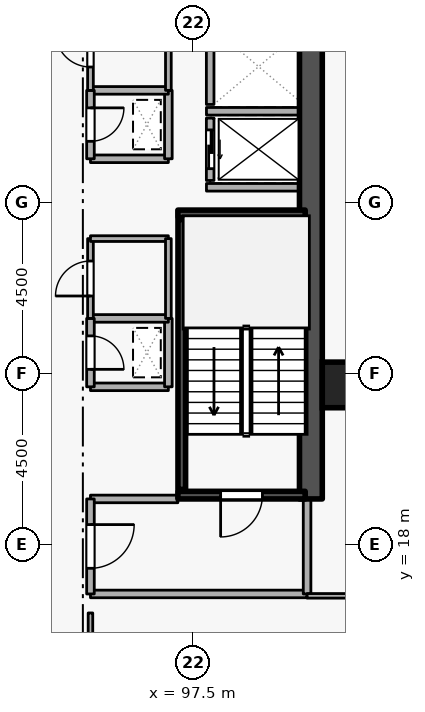
"""IFC4 building model, lengths in metres.
Left out: names, types, materials, properties, quantities, classifications, styles, units other than length and angle.
Written with IfcOpenShell. Run it as: python <this file> out.ifc"""

import sys

from ifc_helpers import new_model, si_unit, direction, frame, frame_2d, origin, origin_2d, place, context, subcontext, project, spatial, rectangle, extrude, element, fill, save


model = new_model("IFC4")
c1 = context("Model", 3, precision=1e-05, world=origin(), true_north=direction((0.0, 1.0)))
c2 = subcontext(c1, "Body", "Model", "MODEL_VIEW")
j1 = project(units=[si_unit("LENGTHUNIT", "METRE"), si_unit("PLANEANGLEUNIT", "RADIAN")], contexts=[c1])
p1 = place(None, origin())
s1 = spatial("IfcSite", under=j1, at=p1, CompositionType="ELEMENT")
p2 = place(p1, origin())
s2 = spatial("IfcBuilding", under=s1, at=p2, CompositionType="ELEMENT")
p3 = place(p2, frame((0.0, 0.0, 98.1)))
s3 = spatial("IfcBuildingStorey", under=s2, at=p3, CompositionType="ELEMENT", Elevation=98.1)
p4 = place(p3, frame((100.6, 19.2, 0.0), z_axis=(0.0, 0.0, 1.0), x_axis=(0.0, 1.0, 0.0)))
e1 = element("IfcWall", 1, at=p4, inside=s3, PredefinedType="SHEAR", context=c2, shape_type="SweptSolid", body=[
    extrude(rectangle(XDim=15.6, YDim=0.6, at=frame_2d((7.8, 0.0))), origin(), (0.0, 0.0, 1.0), 3.6),
])
p5 = place(p3, frame((101.5, 22.2, 0.0), z_axis=(0.0, 0.0, 1.0), x_axis=(1.0, 0.0, 0.0)))
e2 = element("IfcColumn", 2, at=p5, inside=s3, PredefinedType="COLUMN", context=c2, shape_type="SweptSolid", body=[
    extrude(rectangle(XDim=1.2, YDim=1.2, at=origin_2d()), origin(), (0.0, 0.0, 1.0), 3.6),
])
p6 = place(p3, frame((97.95, 29.22, 0.0), z_axis=(0.0, 0.0, 1.0), x_axis=(0.0, -1.0, 0.0)))
e3 = element("IfcWall", 3, at=p6, inside=s3, PredefinedType="STANDARD", context=c2, shape_type="SweptSolid", body=[
    extrude(rectangle(XDim=1.64, YDim=0.2, at=frame_2d((0.82, 0.0))), origin(), (0.0, 0.0, 1.0), 3.3),
])
p7 = place(p6, frame((0.31, 0.0, 0.0)))
e4 = element("IfcOpeningElement", 4, at=p7, cuts=e3, PredefinedType="OPENING", context=c2, shape_type="SweptSolid", body=[
    extrude(rectangle(XDim=1.02, YDim=2.06, at=frame_2d((0.51, 1.03))), frame((0.0, 0.11, 0.0), z_axis=(0.0, -1.0, 0.0), x_axis=(1.0, 0.0, 0.0)), (0.0, 0.0, 1.0), 0.22),
])
p8 = place(p3, frame((97.95, 31.57, 0.0), z_axis=(0.0, 0.0, 1.0), x_axis=(0.0, -1.0, 0.0)))
e5 = element("IfcWall", 5, at=p8, inside=s3, PredefinedType="STANDARD", context=c2, shape_type="SweptSolid", body=[
    extrude(rectangle(XDim=1.99, YDim=0.2, at=frame_2d((0.995, 0.0))), origin(), (0.0, 0.0, 1.0), 3.3),
])
for number, where, z_axis, x_axis in (
    (6, (97.852, 29.4, 0.0), (0.0, 0.0, 1.0), (1.0, 0.0, 0.0)),
    (7, (97.852, 27.4, 0.0), (0.0, 0.0, 1.0), (1.0, 0.0, 0.0)),
):
    element("IfcWall", number, at=place(p3, frame(where, z_axis=z_axis, x_axis=x_axis)), inside=s3, PredefinedType="STANDARD", context=c2, shape_type="SweptSolid", body=[
        extrude(rectangle(XDim=2.436, YDim=0.2, at=frame_2d((1.218, 0.0))), origin(), (0.0, 0.0, 1.0), 3.3),
    ])
p9 = place(p3, frame((100.45, 19.3, 0.0), z_axis=(0.0, 0.0, 1.0), x_axis=(-1.0, 0.0, 0.0)))
e8 = element("IfcWall", 8, at=p9, inside=s3, PredefinedType="SHEAR", context=c2, shape_type="SweptSolid", body=[
    extrude(rectangle(XDim=3.35, YDim=0.2, at=frame_2d((1.675, 0.0))), origin(), (0.0, 0.0, 1.0), 3.6),
])
p10 = place(p9, frame((1.125, 0.0, 0.0)))
e9 = element("IfcOpeningElement", 9, at=p10, cuts=e8, PredefinedType="OPENING", context=c2, shape_type="SweptSolid", body=[
    extrude(rectangle(XDim=1.1, YDim=2.1, at=frame_2d((0.55, 1.05))), frame((0.0, 0.11, 0.0), z_axis=(0.0, -1.0, 0.0), x_axis=(1.0, 0.0, 0.0)), (0.0, 0.0, 1.0), 0.22),
])
p11 = place(p3, frame((97.1, 26.7, 0.0), z_axis=(0.0, 0.0, 1.0), x_axis=(1.0, 0.0, 0.0)))
e10 = element("IfcWall", 10, at=p11, inside=s3, PredefinedType="SHEAR", context=c2, shape_type="SweptSolid", body=[
    extrude(rectangle(XDim=3.35, YDim=0.2, at=frame_2d((1.675, 0.0))), origin(), (0.0, 0.0, 1.0), 3.6),
])
p12 = place(p3, frame((97.203, 26.55, 0.0), z_axis=(0.0, 0.0, 1.0), x_axis=(0.0, -1.0, 0.0)))
e11 = element("IfcWall", 11, at=p12, inside=s3, PredefinedType="SHEAR", context=c2, shape_type="SweptSolid", body=[
    extrude(rectangle(XDim=7.1, YDim=0.2, at=frame_2d((3.55, 0.0))), origin(), (0.0, 0.0, 1.0), 3.6),
])
p13 = place(p3, frame((94.8, 16.7, 0.0), z_axis=(0.0, 0.0, 1.0), x_axis=(1.0, 0.0, 0.0)))
e12 = element("IfcWall", 12, at=p13, inside=s3, PredefinedType="STANDARD", context=c2, shape_type="SweptSolid", body=[
    extrude(rectangle(XDim=5.7, YDim=0.2, at=frame_2d((2.85, 0.0))), origin(), (0.0, 0.0, 1.0), 3.3),
])
p14 = place(p3, frame((100.5, 16.7, 0.0), z_axis=(0.0, 0.0, 1.0), x_axis=(0.0, 1.0, 0.0)))
e13 = element("IfcWall", 13, at=p14, inside=s3, PredefinedType="STANDARD", context=c2, shape_type="SweptSolid", body=[
    extrude(rectangle(XDim=2.5, YDim=0.2, at=frame_2d((1.25, 0.0))), origin(), (0.0, 0.0, 1.0), 3.3),
])
p15 = place(p3, frame((97.1, 19.2, 0.0), z_axis=(0.0, 0.0, 1.0), x_axis=(-1.0, 0.0, 0.0)))
e14 = element("IfcWall", 14, at=p15, inside=s3, PredefinedType="STANDARD", context=c2, shape_type="SweptSolid", body=[
    extrude(rectangle(XDim=2.3, YDim=0.2, at=frame_2d((1.15, 0.0))), origin(), (0.0, 0.0, 1.0), 2.505),
])
p16 = place(p3, frame((94.8, 19.2, 0.0), z_axis=(0.0, 0.0, 1.0), x_axis=(0.0, -1.0, 0.0)))
e15 = element("IfcWall", 15, at=p16, inside=s3, PredefinedType="STANDARD", context=c2, shape_type="SweptSolid", body=[
    extrude(rectangle(XDim=2.5, YDim=0.2, at=frame_2d((1.25, 0.0))), origin(), (0.0, 0.0, 1.0), 3.3),
])
p17 = place(p16, frame((0.675, 0.0, 0.0)))
e16 = element("IfcOpeningElement", 16, at=p17, cuts=e15, PredefinedType="OPENING", context=c2, shape_type="SweptSolid", body=[
    extrude(rectangle(XDim=1.15, YDim=2.1, at=frame_2d((0.575, 1.05))), frame((0.0, 0.11, 0.0), z_axis=(0.0, -1.0, 0.0), x_axis=(1.0, 0.0, 0.0)), (0.0, 0.0, 1.0), 0.22),
])
p18 = place(p3, frame((94.8, 28.15, 0.0), z_axis=(0.0, 0.0, 1.0), x_axis=(1.0, 0.0, 0.0)))
e17 = element("IfcWall", 17, at=p18, inside=s3, PredefinedType="STANDARD", context=c2, shape_type="SweptSolid", body=[
    extrude(rectangle(XDim=2.05, YDim=0.2, at=frame_2d((1.025, 0.0))), origin(), (0.0, 0.0, 1.0), 3.3),
])
p19 = place(p3, frame((96.85, 28.15, 0.0), z_axis=(0.0, 0.0, 1.0), x_axis=(0.0, 1.0, 0.0)))
e18 = element("IfcWall", 18, at=p19, inside=s3, PredefinedType="STANDARD", context=c2, shape_type="SweptSolid", body=[
    extrude(rectangle(XDim=1.8, YDim=0.2, at=frame_2d((0.9, 0.0))), origin(), (0.0, 0.0, 1.0), 3.3),
])
p20 = place(p3, frame((96.85, 29.95, 0.0), z_axis=(0.0, 0.0, 1.0), x_axis=(-1.0, 0.0, 0.0)))
e19 = element("IfcWall", 19, at=p20, inside=s3, PredefinedType="STANDARD", context=c2, shape_type="SweptSolid", body=[
    extrude(rectangle(XDim=2.05, YDim=0.2, at=frame_2d((1.025, 0.0))), origin(), (0.0, 0.0, 1.0), 3.3),
])
p21 = place(p3, frame((94.8, 29.95, 0.0), z_axis=(0.0, 0.0, 1.0), x_axis=(0.0, -1.0, 0.0)))
e20 = element("IfcWall", 20, at=p21, inside=s3, PredefinedType="STANDARD", context=c2, shape_type="SweptSolid", body=[
    extrude(rectangle(XDim=1.8, YDim=0.2, at=frame_2d((0.9, 0.0))), origin(), (0.0, 0.0, 1.0), 3.3),
])
p22 = place(p21, frame((0.46, 0.0, 0.0)))
e21 = element("IfcOpeningElement", 21, at=p22, cuts=e20, PredefinedType="OPENING", context=c2, shape_type="SweptSolid", body=[
    extrude(rectangle(XDim=0.88, YDim=2.04, at=frame_2d((0.44, 1.02))), frame((0.0, 0.11, 0.0), z_axis=(0.0, -1.0, 0.0), x_axis=(1.0, 0.0, 0.0)), (0.0, 0.0, 1.0), 0.22),
])
p23 = place(p3, frame((94.8, 22.15, 0.0), z_axis=(0.0, 0.0, 1.0), x_axis=(1.0, 0.0, 0.0)))
e22 = element("IfcWall", 22, at=p23, inside=s3, PredefinedType="STANDARD", context=c2, shape_type="SweptSolid", body=[
    extrude(rectangle(XDim=2.05, YDim=0.2, at=frame_2d((1.025, 0.0))), origin(), (0.0, 0.0, 1.0), 3.3),
])
p24 = place(p3, frame((96.85, 22.15, 0.0), z_axis=(0.0, 0.0, 1.0), x_axis=(0.0, 1.0, 0.0)))
e23 = element("IfcWall", 23, at=p24, inside=s3, PredefinedType="STANDARD", context=c2, shape_type="SweptSolid", body=[
    extrude(rectangle(XDim=1.8, YDim=0.2, at=frame_2d((0.9, 0.0))), origin(), (0.0, 0.0, 1.0), 3.3),
])
p25 = place(p3, frame((96.85, 23.95, 0.0), z_axis=(0.0, 0.0, 1.0), x_axis=(-1.0, 0.0, 0.0)))
e24 = element("IfcWall", 24, at=p25, inside=s3, PredefinedType="STANDARD", context=c2, shape_type="SweptSolid", body=[
    extrude(rectangle(XDim=2.05, YDim=0.2, at=frame_2d((1.025, 0.0))), origin(), (0.0, 0.0, 1.0), 3.3),
])
p26 = place(p3, frame((94.8, 23.95, 0.0), z_axis=(0.0, 0.0, 1.0), x_axis=(0.0, -1.0, 0.0)))
e25 = element("IfcWall", 25, at=p26, inside=s3, PredefinedType="STANDARD", context=c2, shape_type="SweptSolid", body=[
    extrude(rectangle(XDim=1.8, YDim=0.2, at=frame_2d((0.9, 0.0))), origin(), (0.0, 0.0, 1.0), 3.3),
])
p27 = place(p26, frame((0.46, 0.0, 0.0)))
e26 = element("IfcOpeningElement", 26, at=p27, cuts=e25, PredefinedType="OPENING", context=c2, shape_type="SweptSolid", body=[
    extrude(rectangle(XDim=0.88, YDim=2.04, at=frame_2d((0.44, 1.02))), frame((0.0, 0.11, 0.0), z_axis=(0.0, -1.0, 0.0), x_axis=(1.0, 0.0, 0.0)), (0.0, 0.0, 1.0), 0.22),
])
p28 = place(p3, frame((94.8, 23.95, 0.0), z_axis=(0.0, 0.0, 1.0), x_axis=(0.0, 1.0, 0.0)))
e27 = element("IfcWall", 27, at=p28, inside=s3, PredefinedType="PARTITIONING", context=c2, shape_type="SweptSolid", body=[
    extrude(rectangle(XDim=2.1, YDim=0.15, at=frame_2d((1.05, 0.0))), origin(), (0.0, 0.0, 1.0), 3.3),
])
p29 = place(p28, frame((0.59, 0.0, 0.0)))
e28 = element("IfcOpeningElement", 28, at=p29, cuts=e27, PredefinedType="OPENING", context=c2, shape_type="SweptSolid", body=[
    extrude(rectangle(XDim=0.92, YDim=2.08, at=frame_2d((0.46, 1.04))), frame((0.0, 0.085, 0.0), z_axis=(0.0, -1.0, 0.0), x_axis=(1.0, 0.0, 0.0)), (0.0, 0.0, 1.0), 0.17),
])
p30 = place(p3, frame((94.8, 26.05, 0.0), z_axis=(0.0, 0.0, 1.0), x_axis=(1.0, 0.0, 0.0)))
e29 = element("IfcWall", 29, at=p30, inside=s3, PredefinedType="PARTITIONING", context=c2, shape_type="SweptSolid", body=[
    extrude(rectangle(XDim=2.05, YDim=0.15, at=frame_2d((1.025, 0.0))), origin(), (0.0, 0.0, 1.0), 3.3),
])
p31 = place(p3, frame((96.85, 26.05, 0.0), z_axis=(0.0, 0.0, 1.0), x_axis=(0.0, -1.0, 0.0)))
e30 = element("IfcWall", 30, at=p31, inside=s3, PredefinedType="PARTITIONING", context=c2, shape_type="SweptSolid", body=[
    extrude(rectangle(XDim=2.1, YDim=0.15, at=frame_2d((1.05, 0.0))), origin(), (0.0, 0.0, 1.0), 3.3),
])
p32 = place(p3, frame((94.8, 29.95, 0.0), z_axis=(0.0, 0.0, 1.0), x_axis=(0.0, 1.0, 0.0)))
e31 = element("IfcWall", 31, at=p32, inside=s3, PredefinedType="PARTITIONING", context=c2, shape_type="SweptSolid", body=[
    extrude(rectangle(XDim=2.15, YDim=0.15, at=frame_2d((1.075, 0.0))), origin(), (0.0, 0.0, 1.0), 3.3),
])
p33 = place(p32, frame((0.615, 0.0, 0.0)))
e32 = element("IfcOpeningElement", 32, at=p33, cuts=e31, PredefinedType="OPENING", context=c2, shape_type="SweptSolid", body=[
    extrude(rectangle(XDim=0.92, YDim=2.08, at=frame_2d((0.46, 1.04))), frame((0.0, 0.085, 0.0), z_axis=(0.0, -1.0, 0.0), x_axis=(1.0, 0.0, 0.0)), (0.0, 0.0, 1.0), 0.17),
])
p34 = place(p3, frame((96.85, 32.1, 0.0), z_axis=(0.0, 0.0, 1.0), x_axis=(0.0, -1.0, 0.0)))
e33 = element("IfcWall", 33, at=p34, inside=s3, PredefinedType="PARTITIONING", context=c2, shape_type="SweptSolid", body=[
    extrude(rectangle(XDim=2.15, YDim=0.15, at=frame_2d((1.075, 0.0))), origin(), (0.0, 0.0, 1.0), 3.3),
])
p35 = place(p3, frame((94.8, 14.75, 0.0), z_axis=(0.0, 0.0, 1.0), x_axis=(0.0, 1.0, 0.0)))
e34 = element("IfcWall", 34, at=p35, inside=s3, PredefinedType="PARTITIONING", context=c2, shape_type="SweptSolid", body=[
    extrude(rectangle(XDim=1.45, YDim=0.12, at=frame_2d((0.725, 0.0))), origin(), (0.0, 0.0, 1.0), 3.3),
])
p36 = place(p3, frame((100.5, 16.65, 0.0), z_axis=(0.0, 0.0, 1.0), x_axis=(1.0, 0.0, 0.0)))
e35 = element("IfcWall", 35, at=p36, inside=s3, PredefinedType="PARTITIONING", context=c2, shape_type="SweptSolid", body=[
    extrude(rectangle(XDim=5.92, YDim=0.12, at=frame_2d((2.96, 0.0))), origin(), (0.0, 0.0, 1.0), 3.3),
])
p37 = place(p7, origin())
e36 = element("IfcDoor", 36, at=p37, inside=s3, OperationType="SLIDING_TO_LEFT", PredefinedType="DOOR", context=c2, shape_type="SweptSolid", body=[
    extrude(rectangle(XDim=1.02, YDim=2.06, at=frame_2d((0.51, 1.03))), frame((0.0, 0.025, 0.0), z_axis=(0.0, -1.0, 0.0), x_axis=(1.0, 0.0, 0.0)), (0.0, 0.0, 1.0), 0.05),
])
fill(e4, e36)
p38 = place(p10, origin())
e37 = element("IfcDoor", 37, at=p38, inside=s3, OperationType="SINGLE_SWING_RIGHT", PredefinedType="DOOR", context=c2, shape_type="SweptSolid", body=[
    extrude(rectangle(XDim=1.1, YDim=2.1, at=frame_2d((0.55, 1.05))), frame((0.0, 0.025, 0.0), z_axis=(0.0, -1.0, 0.0), x_axis=(1.0, 0.0, 0.0)), (0.0, 0.0, 1.0), 0.05),
])
fill(e9, e37)
p39 = place(p17, origin())
e38 = element("IfcDoor", 38, at=p39, inside=s3, OperationType="SINGLE_SWING_LEFT", PredefinedType="DOOR", context=c2, shape_type="SweptSolid", body=[
    extrude(rectangle(XDim=1.15, YDim=2.1, at=frame_2d((0.575, 1.05))), frame((0.0, 0.025, 0.0), z_axis=(0.0, -1.0, 0.0), x_axis=(1.0, 0.0, 0.0)), (0.0, 0.0, 1.0), 0.05),
])
fill(e16, e38)
p40 = place(p22, origin())
e39 = element("IfcDoor", 39, at=p40, inside=s3, OperationType="SINGLE_SWING_LEFT", PredefinedType="DOOR", context=c2, shape_type="SweptSolid", body=[
    extrude(rectangle(XDim=0.88, YDim=2.04, at=frame_2d((0.44, 1.02))), frame((0.0, 0.025, 0.0), z_axis=(0.0, -1.0, 0.0), x_axis=(1.0, 0.0, 0.0)), (0.0, 0.0, 1.0), 0.05),
])
fill(e21, e39)
p41 = place(p27, origin())
e40 = element("IfcDoor", 40, at=p41, inside=s3, OperationType="SINGLE_SWING_RIGHT", PredefinedType="DOOR", context=c2, shape_type="SweptSolid", body=[
    extrude(rectangle(XDim=0.88, YDim=2.04, at=frame_2d((0.44, 1.02))), frame((0.0, 0.025, 0.0), z_axis=(0.0, -1.0, 0.0), x_axis=(1.0, 0.0, 0.0)), (0.0, 0.0, 1.0), 0.05),
])
fill(e26, e40)
p42 = place(p29, origin())
e41 = element("IfcDoor", 41, at=p42, inside=s3, OperationType="SINGLE_SWING_LEFT", PredefinedType="DOOR", context=c2, shape_type="SweptSolid", body=[
    extrude(rectangle(XDim=0.92, YDim=2.08, at=frame_2d((0.46, 1.04))), frame((0.0, 0.025, 0.0), z_axis=(0.0, -1.0, 0.0), x_axis=(1.0, 0.0, 0.0)), (0.0, 0.0, 1.0), 0.05),
])
fill(e28, e41)
p43 = place(p33, origin())
e42 = element("IfcDoor", 42, at=p43, inside=s3, OperationType="SINGLE_SWING_RIGHT", PredefinedType="DOOR", context=c2, shape_type="SweptSolid", body=[
    extrude(rectangle(XDim=0.92, YDim=2.08, at=frame_2d((0.46, 1.04))), frame((0.0, 0.025, 0.0), z_axis=(0.0, -1.0, 0.0), x_axis=(1.0, 0.0, 0.0)), (0.0, 0.0, 1.0), 0.05),
])
fill(e32, e42)
save(model, sys.argv[1])
